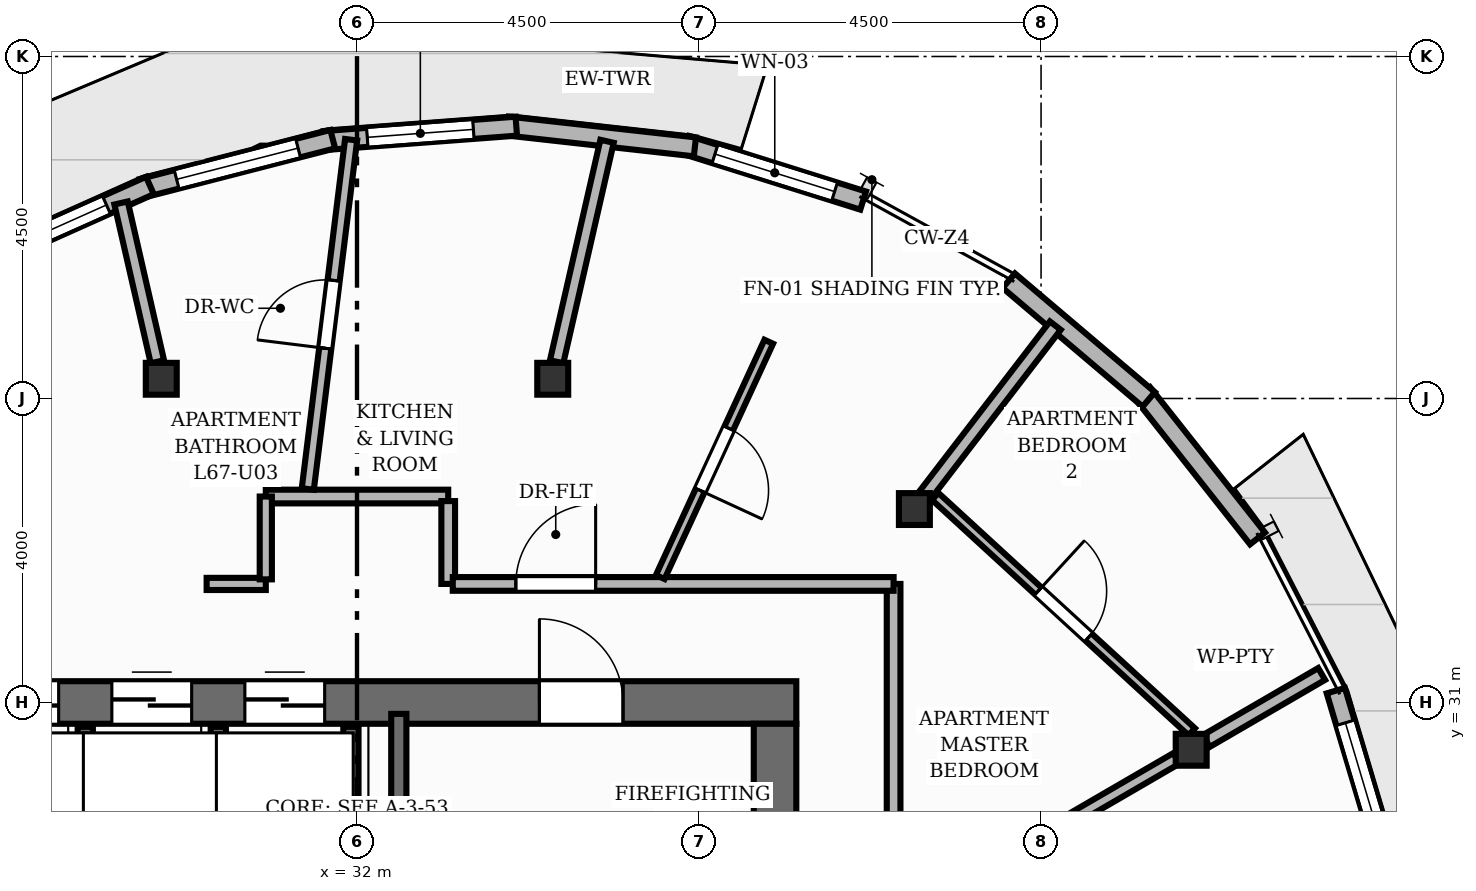
"""IFC4 building model, lengths in metres.
Left out: names, types, materials, properties, quantities, classifications, styles, units other than length and angle.
Written with IfcOpenShell. Run it as: python <this file> out.ifc"""

import sys

from ifc_helpers import new_model, si_unit, direction, frame, frame_2d, origin, origin_2d, place, context, subcontext, project, spatial, rectangle, i_section, extrude, element, fill, save


model = new_model("IFC4")
c1 = context("Model", 3, precision=1e-05, world=origin(), true_north=direction((0.0, 1.0)))
c2 = subcontext(c1, "Body", "Model", "MODEL_VIEW")
j1 = project(units=[si_unit("LENGTHUNIT", "METRE"), si_unit("PLANEANGLEUNIT", "RADIAN")], contexts=[c1])
p1 = place(None, origin())
s1 = spatial("IfcSite", under=j1, at=p1, CompositionType="ELEMENT")
p2 = place(p1, origin())
s2 = spatial("IfcBuilding", under=s1, at=p2, CompositionType="ELEMENT")
p3 = place(p2, frame((0.0, 0.0, 223.84)))
s3 = spatial("IfcBuildingStorey", under=s2, at=p3, CompositionType="ELEMENT", Elevation=223.84)
p4 = place(p3, frame((26.22, 31.0, 0.0), z_axis=(0.0, 0.0, 1.0), x_axis=(1.0, 0.0, 0.0)))
e1 = element("IfcWall", 1, at=p4, inside=s3, PredefinedType="SHEAR", context=c2, shape_type="SweptSolid", body=[
    extrude(rectangle(XDim=11.56, YDim=0.56, at=frame_2d((5.78, 0.0))), origin(), (0.0, 0.0, 1.0), 3.2),
])
p5 = place(p4, frame((8.18, 0.0, 0.0)))
e2 = element("IfcOpeningElement", 2, at=p5, cuts=e1, PredefinedType="OPENING", context=c2, shape_type="SweptSolid", body=[
    extrude(rectangle(XDim=1.1, YDim=2.15, at=frame_2d((0.55, 1.075))), frame((0.0, 0.29, 0.0), z_axis=(0.0, -1.0, 0.0), x_axis=(1.0, 0.0, 0.0)), (0.0, 0.0, 1.0), 0.58),
])
p6 = place(p4, frame((0.805, 0.0, 0.0)))
e3 = element("IfcOpeningElement", 3, at=p6, cuts=e1, PredefinedType="OPENING", context=c2, shape_type="SweptSolid", body=[
    extrude(rectangle(XDim=1.05, YDim=2.15, at=frame_2d((0.525, 1.075))), frame((0.0, 0.29, 0.0), z_axis=(0.0, -1.0, 0.0), x_axis=(1.0, 0.0, 0.0)), (0.0, 0.0, 1.0), 0.58),
])
p7 = place(p4, frame((2.555, 0.0, 0.0)))
e4 = element("IfcOpeningElement", 4, at=p7, cuts=e1, PredefinedType="OPENING", context=c2, shape_type="SweptSolid", body=[
    extrude(rectangle(XDim=1.05, YDim=2.15, at=frame_2d((0.525, 1.075))), frame((0.0, 0.29, 0.0), z_axis=(0.0, -1.0, 0.0), x_axis=(1.0, 0.0, 0.0)), (0.0, 0.0, 1.0), 0.58),
])
p8 = place(p4, frame((4.305, 0.0, 0.0)))
e5 = element("IfcOpeningElement", 5, at=p8, cuts=e1, PredefinedType="OPENING", context=c2, shape_type="SweptSolid", body=[
    extrude(rectangle(XDim=1.05, YDim=2.15, at=frame_2d((0.525, 1.075))), frame((0.0, 0.29, 0.0), z_axis=(0.0, -1.0, 0.0), x_axis=(1.0, 0.0, 0.0)), (0.0, 0.0, 1.0), 0.58),
])
p9 = place(p3, frame((37.5, 17.28, 0.0), z_axis=(0.0, 0.0, 1.0), x_axis=(0.0, 1.0, 0.0)))
e6 = element("IfcWall", 6, at=p9, inside=s3, PredefinedType="SHEAR", context=c2, shape_type="SweptSolid", body=[
    extrude(rectangle(XDim=13.44, YDim=0.56, at=frame_2d((6.72, 0.0))), origin(), (0.0, 0.0, 1.0), 3.2),
])
for number, where, z_axis, x_axis in (
    (7, (42.975, 30.378, 0.0), (0.0, 0.0, 1.0), (1.0, 0.0, 0.0)),
    (8, (39.333, 33.545, 0.0), (0.0, 0.0, 1.0), (1.0, 0.0, 0.0)),
    (9, (34.575, 35.26, 0.0), (0.0, 0.0, 1.0), (1.0, 0.0, 0.0)),
    (10, (29.425, 35.26, 0.0), (0.0, 0.0, 1.0), (1.0, 0.0, 0.0)),
):
    element("IfcColumn", number, at=place(p3, frame(where, z_axis=z_axis, x_axis=x_axis)), inside=s3, PredefinedType="COLUMN", context=c2, shape_type="SweptSolid", body=[
        extrude(i_section(OverallWidth=0.407, OverallDepth=0.419, WebThickness=0.031, FlangeThickness=0.049, at=origin_2d()), origin(), (0.0, 0.0, 1.0), 3.2),
    ])
p10 = place(p3, frame((36.334, 38.334, 0.0), z_axis=(0.0, 0.0, 1.0), x_axis=(0.95407801166, -0.299558254212, 0.0)))
e11 = element("IfcWall", 11, at=p10, inside=s3, PredefinedType="SOLIDWALL", context=c2, shape_type="SweptSolid", body=[
    extrude(rectangle(XDim=2.437, YDim=0.25, at=frame_2d((1.218, 0.0))), origin(), (0.0, 0.0, 1.0), 2.96),
])
p11 = place(p10, frame((0.393, 0.0, 0.85)))
e12 = element("IfcOpeningElement", 12, at=p11, cuts=e11, PredefinedType="OPENING", context=c2, shape_type="SweptSolid", body=[
    extrude(rectangle(XDim=1.65, YDim=1.55, at=frame_2d((0.825, 0.775))), frame((0.0, 0.135, 0.0), z_axis=(0.0, -1.0, 0.0), x_axis=(1.0, 0.0, 0.0)), (0.0, 0.0, 1.0), 0.27),
])
p12 = place(p3, frame((33.983, 38.585, 0.0), z_axis=(0.0, 0.0, 1.0), x_axis=(0.993859679734, -0.110647806121, 0.0)))
e13 = element("IfcWall", 13, at=p12, inside=s3, PredefinedType="SOLIDWALL", context=c2, shape_type="SweptSolid", body=[
    extrude(rectangle(XDim=2.478, YDim=0.25, at=frame_2d((1.239, 0.0))), origin(), (0.0, 0.0, 1.0), 2.96),
])
p13 = place(p3, frame((31.571, 38.394, 0.0), z_axis=(0.0, 0.0, 1.0), x_axis=(0.997203982256, 0.074727623888, 0.0)))
e14 = element("IfcWall", 14, at=p13, inside=s3, PredefinedType="SOLIDWALL", context=c2, shape_type="SweptSolid", body=[
    extrude(rectangle(XDim=2.532, YDim=0.25, at=frame_2d((1.266, 0.0))), origin(), (0.0, 0.0, 1.0), 2.96),
])
p14 = place(p13, frame((0.566, 0.0, 0.85)))
e15 = element("IfcOpeningElement", 15, at=p14, cuts=e14, PredefinedType="OPENING", context=c2, shape_type="SweptSolid", body=[
    extrude(rectangle(XDim=1.4, YDim=1.55, at=frame_2d((0.7, 0.775))), frame((0.0, 0.135, 0.0), z_axis=(0.0, -1.0, 0.0), x_axis=(1.0, 0.0, 0.0)), (0.0, 0.0, 1.0), 0.27),
])
p15 = place(p3, frame((29.171, 37.766, 0.0), z_axis=(0.0, 0.0, 1.0), x_axis=(0.968423445169, 0.249311112562, 0.0)))
e16 = element("IfcWall", 16, at=p15, inside=s3, PredefinedType="SOLIDWALL", context=c2, shape_type="SweptSolid", body=[
    extrude(rectangle(XDim=2.592, YDim=0.25, at=frame_2d((1.296, 0.0))), origin(), (0.0, 0.0, 1.0), 2.96),
])
p16 = place(p15, frame((0.471, 0.0, 0.85)))
e17 = element("IfcOpeningElement", 17, at=p16, cuts=e16, PredefinedType="OPENING", context=c2, shape_type="SweptSolid", body=[
    extrude(rectangle(XDim=1.65, YDim=1.55, at=frame_2d((0.825, 0.775))), frame((0.0, 0.135, 0.0), z_axis=(0.0, -1.0, 0.0), x_axis=(1.0, 0.0, 0.0)), (0.0, 0.0, 1.0), 0.27),
])
p17 = place(p3, frame((26.855, 36.719, 0.0), z_axis=(0.0, 0.0, 1.0), x_axis=(0.912779399898, 0.408452894617, 0.0)))
e18 = element("IfcWall", 18, at=p17, inside=s3, PredefinedType="SOLIDWALL", context=c2, shape_type="SweptSolid", body=[
    extrude(rectangle(XDim=2.651, YDim=0.25, at=frame_2d((1.325, 0.0))), origin(), (0.0, 0.0, 1.0), 2.96),
])
p18 = place(p17, frame((0.625, 0.0, 0.85)))
e19 = element("IfcOpeningElement", 19, at=p18, cuts=e18, PredefinedType="OPENING", context=c2, shape_type="SweptSolid", body=[
    extrude(rectangle(XDim=1.4, YDim=1.52, at=frame_2d((0.7, 0.76))), frame((0.0, 0.135, 0.0), z_axis=(0.0, -1.0, 0.0), x_axis=(1.0, 0.0, 0.0)), (0.0, 0.0, 1.0), 0.27),
])
p19 = place(p3, frame((44.878, 31.156, 0.0), z_axis=(0.0, 0.0, 1.0), x_axis=(0.285604720301, -0.958347506775, 0.0)))
e20 = element("IfcWall", 20, at=p19, inside=s3, PredefinedType="SOLIDWALL", context=c2, shape_type="SweptSolid", body=[
    extrude(rectangle(XDim=2.532, YDim=0.25, at=frame_2d((1.266, 0.0))), origin(), (0.0, 0.0, 1.0), 2.96),
])
p20 = place(p19, frame((0.441, 0.0, 0.85)))
e21 = element("IfcOpeningElement", 21, at=p20, cuts=e20, PredefinedType="OPENING", context=c2, shape_type="SweptSolid", body=[
    extrude(rectangle(XDim=1.65, YDim=1.55, at=frame_2d((0.825, 0.775))), frame((0.0, 0.135, 0.0), z_axis=(0.0, -1.0, 0.0), x_axis=(1.0, 0.0, 0.0)), (0.0, 0.0, 1.0), 0.27),
])
p21 = place(p3, frame((42.337, 35.071, 0.0), z_axis=(0.0, 0.0, 1.0), x_axis=(0.619881401672, -0.784695512833, 0.0)))
e22 = element("IfcWall", 22, at=p21, inside=s3, PredefinedType="SOLIDWALL", context=c2, shape_type="SweptSolid", body=[
    extrude(rectangle(XDim=2.437, YDim=0.25, at=frame_2d((1.218, 0.0))), origin(), (0.0, 0.0, 1.0), 2.96),
])
p22 = place(p3, frame((40.575, 36.55, 0.0), z_axis=(0.0, 0.0, 1.0), x_axis=(0.762614923672, -0.646852748462, 0.0)))
e23 = element("IfcWall", 23, at=p22, inside=s3, PredefinedType="SOLIDWALL", context=c2, shape_type="SweptSolid", body=[
    extrude(rectangle(XDim=2.415, YDim=0.25, at=frame_2d((1.208, 0.0))), origin(), (0.0, 0.0, 1.0), 2.96),
])
p23 = place(p3, frame((32.55, 27.35, 0.0), z_axis=(0.0, 0.0, 1.0), x_axis=(0.0, 1.0, 0.0)))
e24 = element("IfcWall", 24, at=p23, inside=s3, PredefinedType="SHEAR", context=c2, shape_type="SweptSolid", body=[
    extrude(rectangle(XDim=3.5, YDim=0.2, at=frame_2d((1.75, 0.0))), origin(), (0.0, 0.0, 1.0), 3.2),
])
for number, where, z_axis, x_axis in (
    (25, (31.92, 29.02, 0.0), (0.0, 0.0, 1.0), (0.0, 1.0, 0.0)),
    (26, (28.425, 29.02, 0.0), (0.0, 0.0, 1.0), (0.0, 1.0, 0.0)),
    (27, (30.175, 29.02, 0.0), (0.0, 0.0, 1.0), (0.0, 1.0, 0.0)),
):
    element("IfcWall", number, at=place(p3, frame(where, z_axis=z_axis, x_axis=x_axis)), inside=s3, PredefinedType="SHEAR", context=c2, shape_type="SweptSolid", body=[
        extrude(rectangle(XDim=1.66, YDim=0.2, at=frame_2d((0.83, 0.0))), origin(), (0.0, 0.0, 1.0), 3.2),
    ])
p24 = place(p3, frame((43.174, 30.493, 0.0), z_axis=(0.0, 0.0, 1.0), x_axis=(0.864599922959, 0.502460917106, 0.0)))
e28 = element("IfcWall", 28, at=p24, inside=s3, PredefinedType="PARTITIONING", context=c2, shape_type="SweptSolid", body=[
    extrude(rectangle(XDim=1.756, YDim=0.18, at=frame_2d((0.878, 0.0))), origin(), (0.0, 0.0, 1.0), 2.403),
])
p25 = place(p3, frame((39.473, 33.727, 0.0), z_axis=(0.0, 0.0, 1.0), x_axis=(0.609232660573, 0.792991529142, 0.0)))
e29 = element("IfcWall", 29, at=p25, inside=s3, PredefinedType="PARTITIONING", context=c2, shape_type="SweptSolid", body=[
    extrude(rectangle(XDim=2.814, YDim=0.18, at=frame_2d((1.407, 0.0))), origin(), (0.0, 0.0, 1.0), 2.403),
])
p26 = place(p3, frame((34.626, 35.483, 0.0), z_axis=(0.0, 0.0, 1.0), x_axis=(0.22291168124, 0.974838644272, 0.0)))
e30 = element("IfcWall", 30, at=p26, inside=s3, PredefinedType="PARTITIONING", context=c2, shape_type="SweptSolid", body=[
    extrude(rectangle(XDim=2.976, YDim=0.18, at=frame_2d((1.488, 0.0))), origin(), (0.0, 0.0, 1.0), 2.403),
])
p27 = place(p3, frame((29.374, 35.483, 0.0), z_axis=(0.0, 0.0, 1.0), x_axis=(-0.222945438732, 0.974830924493, 0.0)))
e31 = element("IfcWall", 31, at=p27, inside=s3, PredefinedType="PARTITIONING", context=c2, shape_type="SweptSolid", body=[
    extrude(rectangle(XDim=2.143, YDim=0.18, at=frame_2d((1.072, 0.0))), origin(), (0.0, 0.0, 1.0), 2.403),
])
p28 = place(p3, frame((39.06, 32.56, 0.0), z_axis=(0.0, 0.0, 1.0), x_axis=(0.0, -1.0, 0.0)))
e32 = element("IfcWall", 32, at=p28, inside=s3, PredefinedType="PARTITIONING", context=c2, shape_type="SweptSolid", body=[
    extrude(rectangle(XDim=17.12, YDim=0.18, at=frame_2d((8.56, 0.0))), origin(), (0.0, 0.0, 1.0), 2.955),
])
p29 = place(p28, frame((8.815, 0.0, 0.0)))
e33 = element("IfcOpeningElement", 33, at=p29, cuts=e32, PredefinedType="OPENING", context=c2, shape_type="SweptSolid", body=[
    extrude(rectangle(XDim=1.05, YDim=2.15, at=frame_2d((0.525, 1.075))), frame((0.0, 0.1, 0.0), z_axis=(0.0, -1.0, 0.0), x_axis=(1.0, 0.0, 0.0)), (0.0, 0.0, 1.0), 0.2),
])
p30 = place(p3, frame((30.8, 33.71, 0.0), z_axis=(0.0, 0.0, 1.0), x_axis=(1.0, 0.0, 0.0)))
e34 = element("IfcWall", 34, at=p30, inside=s3, PredefinedType="PARTITIONING", context=c2, shape_type="SweptSolid", body=[
    extrude(rectangle(XDim=2.4, YDim=0.18, at=frame_2d((1.2, 0.0))), origin(), (0.0, 0.0, 1.0), 2.955),
])
p31 = place(p3, frame((33.2, 33.65, 0.0), z_axis=(0.0, 0.0, 1.0), x_axis=(0.0, -1.0, 0.0)))
e35 = element("IfcWall", 35, at=p31, inside=s3, PredefinedType="PARTITIONING", context=c2, shape_type="SweptSolid", body=[
    extrude(rectangle(XDim=1.09, YDim=0.18, at=frame_2d((0.545, 0.0))), origin(), (0.0, 0.0, 1.0), 2.955),
])
p32 = place(p3, frame((33.26, 32.56, 0.0), z_axis=(0.0, 0.0, 1.0), x_axis=(1.0, 0.0, 0.0)))
e36 = element("IfcWall", 36, at=p32, inside=s3, PredefinedType="PARTITIONING", context=c2, shape_type="SweptSolid", body=[
    extrude(rectangle(XDim=5.8, YDim=0.18, at=frame_2d((2.9, 0.0))), origin(), (0.0, 0.0, 1.0), 2.955),
])
p33 = place(p32, frame((0.83, 0.0, 0.0)))
e37 = element("IfcOpeningElement", 37, at=p33, cuts=e36, PredefinedType="OPENING", context=c2, shape_type="SweptSolid", body=[
    extrude(rectangle(XDim=1.05, YDim=2.15, at=frame_2d((0.525, 1.075))), frame((0.0, 0.1, 0.0), z_axis=(0.0, -1.0, 0.0), x_axis=(1.0, 0.0, 0.0)), (0.0, 0.0, 1.0), 0.2),
])
p34 = place(p3, frame((30.022, 32.56, 0.0), z_axis=(0.0, 0.0, 1.0), x_axis=(1.0, 0.0, 0.0)))
e38 = element("IfcWall", 38, at=p34, inside=s3, PredefinedType="PLUMBINGWALL", context=c2, shape_type="SweptSolid", body=[
    extrude(rectangle(XDim=0.778, YDim=0.16, at=frame_2d((0.389, 0.0))), origin(), (0.0, 0.0, 1.0), 2.955),
])
p35 = place(p3, frame((30.8, 32.62, 0.0), z_axis=(0.0, 0.0, 1.0), x_axis=(0.0, 1.0, 0.0)))
e39 = element("IfcWall", 39, at=p35, inside=s3, PredefinedType="PLUMBINGWALL", context=c2, shape_type="SweptSolid", body=[
    extrude(rectangle(XDim=1.09, YDim=0.16, at=frame_2d((0.545, 0.0))), origin(), (0.0, 0.0, 1.0), 2.955),
])
p36 = place(p3, frame((39.06, 28.103, 0.0), z_axis=(0.0, 0.0, 1.0), x_axis=(0.864618907014, 0.502428249239, 0.0)))
e40 = element("IfcWall", 40, at=p36, inside=s3, PredefinedType="PLUMBINGWALL", context=c2, shape_type="SweptSolid", body=[
    extrude(rectangle(XDim=4.305, YDim=0.16, at=frame_2d((2.153, 0.0))), origin(), (0.0, 0.0, 1.0), 2.403),
])
p37 = place(p3, frame((31.353, 33.809, 0.0), z_axis=(0.0, 0.0, 1.0), x_axis=(0.123041966912, 0.992401468348, 0.0)))
e41 = element("IfcWall", 41, at=p37, inside=s3, PredefinedType="PLUMBINGWALL", context=c2, shape_type="SweptSolid", body=[
    extrude(rectangle(XDim=4.631, YDim=0.16, at=frame_2d((2.315, 0.0))), origin(), (0.0, 0.0, 1.0), 2.692),
])
p38 = place(p37, frame((1.865, 0.0, 0.0)))
e42 = element("IfcOpeningElement", 42, at=p38, cuts=e41, PredefinedType="OPENING", context=c2, shape_type="SweptSolid", body=[
    extrude(rectangle(XDim=0.9, YDim=2.1, at=frame_2d((0.45, 1.05))), frame((0.0, 0.09, 0.0), z_axis=(0.0, -1.0, 0.0), x_axis=(1.0, 0.0, 0.0)), (0.0, 0.0, 1.0), 0.18),
])
p39 = place(p3, frame((37.417, 35.747, 0.0), z_axis=(0.0, 0.0, 1.0), x_axis=(-0.41880384085, -0.908076727424, 0.0)))
e43 = element("IfcWall", 43, at=p39, inside=s3, PredefinedType="PARTITIONING", context=c2, shape_type="SweptSolid", body=[
    extrude(rectangle(XDim=3.409, YDim=0.125, at=frame_2d((1.705, 0.0))), origin(), (0.0, 0.0, 1.0), 2.955),
])
p40 = place(p39, frame((1.255, 0.0, 0.0)))
e44 = element("IfcOpeningElement", 44, at=p40, cuts=e43, PredefinedType="OPENING", context=c2, shape_type="SweptSolid", body=[
    extrude(rectangle(XDim=0.9, YDim=2.1, at=frame_2d((0.45, 1.05))), frame((0.0, 0.073, 0.0), z_axis=(0.0, -1.0, 0.0), x_axis=(1.0, 0.0, 0.0)), (0.0, 0.0, 1.0), 0.145),
])
p41 = place(p3, frame((39.607, 33.712, 0.0), z_axis=(0.0, 0.0, 1.0), x_axis=(0.736828890574, -0.676079274949, 0.0)))
e45 = element("IfcWall", 45, at=p41, inside=s3, PredefinedType="PARTITIONING", context=c2, shape_type="SweptSolid", body=[
    extrude(rectangle(XDim=4.582, YDim=0.125, at=frame_2d((2.291, 0.0))), origin(), (0.0, 0.0, 1.0), 2.488),
])
p42 = place(p41, frame((1.841, 0.0, 0.0)))
e46 = element("IfcOpeningElement", 46, at=p42, cuts=e45, PredefinedType="OPENING", context=c2, shape_type="SweptSolid", body=[
    extrude(rectangle(XDim=0.9, YDim=2.1, at=frame_2d((0.45, 1.05))), frame((0.0, 0.073, 0.0), z_axis=(0.0, -1.0, 0.0), x_axis=(1.0, 0.0, 0.0)), (0.0, 0.0, 1.0), 0.145),
])
p43 = place(p11, origin())
e47 = element("IfcWindow", 47, at=p43, inside=s3, PartitioningType="SINGLE_PANEL", PredefinedType="WINDOW", context=c2, shape_type="SweptSolid", body=[
    extrude(rectangle(XDim=1.65, YDim=1.55, at=frame_2d((0.825, 0.775))), frame((0.0, 0.03, 0.0), z_axis=(0.0, -1.0, 0.0), x_axis=(1.0, 0.0, 0.0)), (0.0, 0.0, 1.0), 0.06),
])
fill(e12, e47)
p44 = place(p14, origin())
e48 = element("IfcWindow", 48, at=p44, inside=s3, PartitioningType="SINGLE_PANEL", PredefinedType="WINDOW", context=c2, shape_type="SweptSolid", body=[
    extrude(rectangle(XDim=1.4, YDim=1.55, at=frame_2d((0.7, 0.775))), frame((0.0, 0.03, 0.0), z_axis=(0.0, -1.0, 0.0), x_axis=(1.0, 0.0, 0.0)), (0.0, 0.0, 1.0), 0.06),
])
fill(e15, e48)
p45 = place(p16, origin())
e49 = element("IfcWindow", 49, at=p45, inside=s3, PartitioningType="SINGLE_PANEL", PredefinedType="WINDOW", context=c2, shape_type="SweptSolid", body=[
    extrude(rectangle(XDim=1.65, YDim=1.55, at=frame_2d((0.825, 0.775))), frame((0.0, 0.03, 0.0), z_axis=(0.0, -1.0, 0.0), x_axis=(1.0, 0.0, 0.0)), (0.0, 0.0, 1.0), 0.06),
])
fill(e17, e49)
p46 = place(p18, origin())
e50 = element("IfcWindow", 50, at=p46, inside=s3, PartitioningType="SINGLE_PANEL", PredefinedType="WINDOW", context=c2, shape_type="SweptSolid", body=[
    extrude(rectangle(XDim=1.4, YDim=1.52, at=frame_2d((0.7, 0.76))), frame((0.0, 0.03, 0.0), z_axis=(0.0, -1.0, 0.0), x_axis=(1.0, 0.0, 0.0)), (0.0, 0.0, 1.0), 0.06),
])
fill(e19, e50)
p47 = place(p20, origin())
e51 = element("IfcWindow", 51, at=p47, inside=s3, PartitioningType="SINGLE_PANEL", PredefinedType="WINDOW", context=c2, shape_type="SweptSolid", body=[
    extrude(rectangle(XDim=1.65, YDim=1.55, at=frame_2d((0.825, 0.775))), frame((0.0, 0.03, 0.0), z_axis=(0.0, -1.0, 0.0), x_axis=(1.0, 0.0, 0.0)), (0.0, 0.0, 1.0), 0.06),
])
fill(e21, e51)
p48 = place(p5, origin())
e52 = element("IfcDoor", 52, at=p48, inside=s3, OperationType="SINGLE_SWING_LEFT", PredefinedType="DOOR", context=c2, shape_type="SweptSolid", body=[
    extrude(rectangle(XDim=1.1, YDim=2.15, at=frame_2d((0.55, 1.075))), frame((0.0, 0.025, 0.0), z_axis=(0.0, -1.0, 0.0), x_axis=(1.0, 0.0, 0.0)), (0.0, 0.0, 1.0), 0.05),
])
fill(e2, e52)
p49 = place(p6, origin())
e53 = element("IfcDoor", 53, at=p49, inside=s3, OperationType="DOUBLE_DOOR_SLIDING", PredefinedType="DOOR", context=c2, shape_type="SweptSolid", body=[
    extrude(rectangle(XDim=1.05, YDim=2.15, at=frame_2d((0.525, 1.075))), frame((0.0, 0.025, 0.0), z_axis=(0.0, -1.0, 0.0), x_axis=(1.0, 0.0, 0.0)), (0.0, 0.0, 1.0), 0.05),
])
fill(e3, e53)
p50 = place(p7, origin())
e54 = element("IfcDoor", 54, at=p50, inside=s3, OperationType="DOUBLE_DOOR_SLIDING", PredefinedType="DOOR", context=c2, shape_type="SweptSolid", body=[
    extrude(rectangle(XDim=1.05, YDim=2.15, at=frame_2d((0.525, 1.075))), frame((0.0, 0.025, 0.0), z_axis=(0.0, -1.0, 0.0), x_axis=(1.0, 0.0, 0.0)), (0.0, 0.0, 1.0), 0.05),
])
fill(e4, e54)
p51 = place(p8, origin())
e55 = element("IfcDoor", 55, at=p51, inside=s3, OperationType="DOUBLE_DOOR_SLIDING", PredefinedType="DOOR", context=c2, shape_type="SweptSolid", body=[
    extrude(rectangle(XDim=1.05, YDim=2.15, at=frame_2d((0.525, 1.075))), frame((0.0, 0.025, 0.0), z_axis=(0.0, -1.0, 0.0), x_axis=(1.0, 0.0, 0.0)), (0.0, 0.0, 1.0), 0.05),
])
fill(e5, e55)
p52 = place(p33, origin())
e56 = element("IfcDoor", 56, at=p52, inside=s3, OperationType="SINGLE_SWING_RIGHT", PredefinedType="DOOR", context=c2, shape_type="SweptSolid", body=[
    extrude(rectangle(XDim=1.05, YDim=2.15, at=frame_2d((0.525, 1.075))), frame((0.0, 0.025, 0.0), z_axis=(0.0, -1.0, 0.0), x_axis=(1.0, 0.0, 0.0)), (0.0, 0.0, 1.0), 0.05),
])
fill(e37, e56)
p53 = place(p38, origin())
e57 = element("IfcDoor", 57, at=p53, inside=s3, OperationType="SINGLE_SWING_LEFT", PredefinedType="DOOR", context=c2, shape_type="SweptSolid", body=[
    extrude(rectangle(XDim=0.9, YDim=2.1, at=frame_2d((0.45, 1.05))), frame((0.0, 0.025, 0.0), z_axis=(0.0, -1.0, 0.0), x_axis=(1.0, 0.0, 0.0)), (0.0, 0.0, 1.0), 0.05),
])
fill(e42, e57)
p54 = place(p40, origin())
e58 = element("IfcDoor", 58, at=p54, inside=s3, OperationType="SINGLE_SWING_RIGHT", PredefinedType="DOOR", context=c2, shape_type="SweptSolid", body=[
    extrude(rectangle(XDim=0.9, YDim=2.1, at=frame_2d((0.45, 1.05))), frame((0.0, 0.025, 0.0), z_axis=(0.0, -1.0, 0.0), x_axis=(1.0, 0.0, 0.0)), (0.0, 0.0, 1.0), 0.05),
])
fill(e44, e58)
p55 = place(p42, origin())
e59 = element("IfcDoor", 59, at=p55, inside=s3, OperationType="SINGLE_SWING_LEFT", PredefinedType="DOOR", context=c2, shape_type="SweptSolid", body=[
    extrude(rectangle(XDim=0.9, YDim=2.1, at=frame_2d((0.45, 1.05))), frame((0.0, 0.025, 0.0), z_axis=(0.0, -1.0, 0.0), x_axis=(1.0, 0.0, 0.0)), (0.0, 0.0, 1.0), 0.05),
])
fill(e46, e59)
save(model, sys.argv[1])
